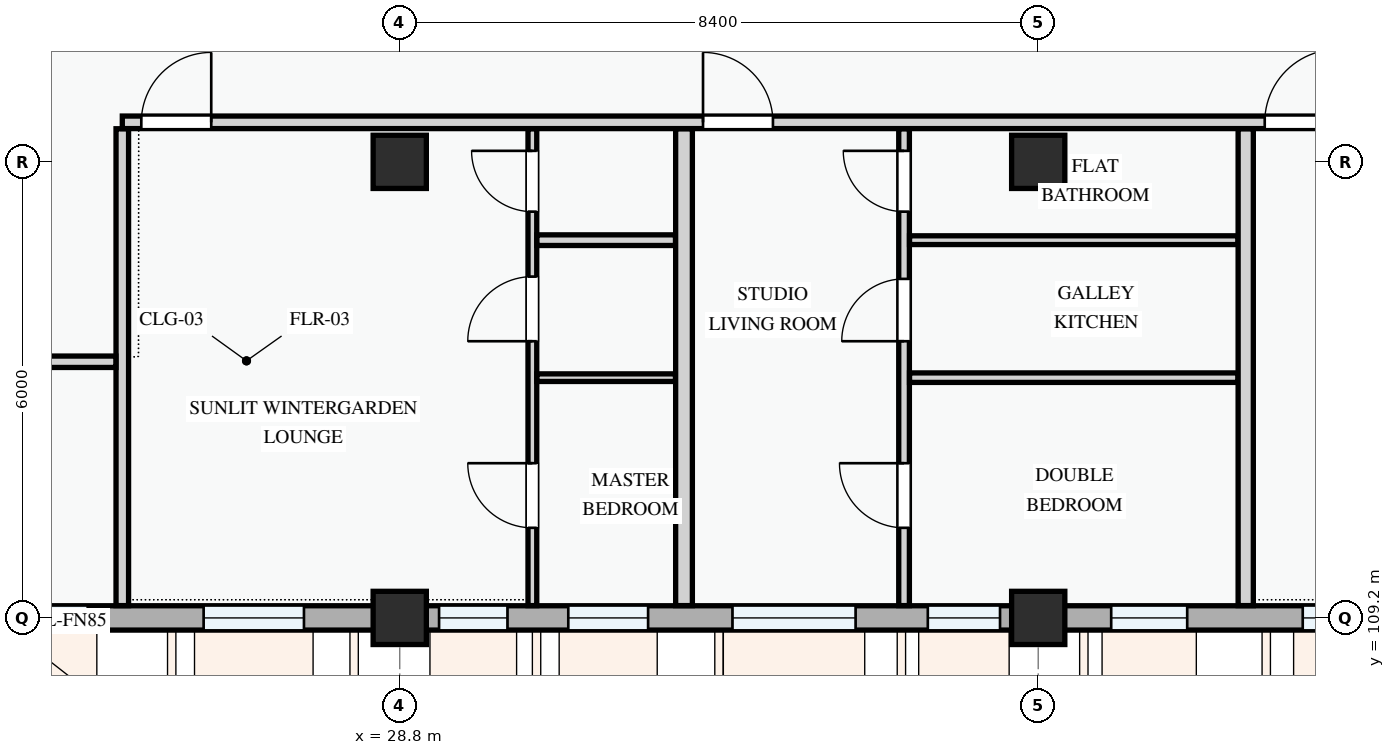
"""IFC4 building model, lengths in metres.
Left out: names, types, materials, properties, quantities, classifications, styles, units other than length and angle.
Written with IfcOpenShell. Run it as: python <this file> out.ifc"""

import sys

from ifc_helpers import new_model, si_unit, direction, frame, frame_2d, origin, origin_2d, place, context, subcontext, project, spatial, rectangle, extrude, element, fill, save


model = new_model("IFC4")
c1 = context("Model", 3, precision=1e-05, world=origin(), true_north=direction((0.0, 1.0)))
c2 = subcontext(c1, "Body", "Model", "MODEL_VIEW")
j1 = project(units=[si_unit("LENGTHUNIT", "METRE"), si_unit("PLANEANGLEUNIT", "RADIAN")], contexts=[c1])
p1 = place(None, origin())
s1 = spatial("IfcSite", under=j1, at=p1, CompositionType="ELEMENT")
p2 = place(p1, origin())
s2 = spatial("IfcBuilding", under=s1, at=p2, CompositionType="ELEMENT")
p3 = place(p2, frame((0.0, 0.0, 21.3)))
s3 = spatial("IfcBuildingStorey", under=s2, at=p3, CompositionType="ELEMENT", Elevation=21.3)
for number, where, z_axis, x_axis in (
    (1, (28.8, 109.2, 0.0), (0.0, 0.0, 1.0), (1.0, 0.0, 0.0)),
    (2, (28.8, 115.2, 0.0), (0.0, 0.0, 1.0), (1.0, 0.0, 0.0)),
    (3, (37.2, 109.2, 0.0), (0.0, 0.0, 1.0), (1.0, 0.0, 0.0)),
    (4, (37.2, 115.2, 0.0), (0.0, 0.0, 1.0), (1.0, 0.0, 0.0)),
):
    element("IfcColumn", number, at=place(p3, frame(where, z_axis=z_axis, x_axis=x_axis)), inside=s3, PredefinedType="COLUMN", context=c2, shape_type="SweptSolid", body=[
        extrude(rectangle(XDim=0.7, YDim=0.7, at=origin_2d()), origin(), (0.0, 0.0, 1.0), 3.3),
    ])
p4 = place(p3, frame((22.8, 109.2, 0.0), z_axis=(0.0, 0.0, 1.0), x_axis=(1.0, 0.0, 0.0)))
e5 = element("IfcWall", 5, at=p4, inside=s3, PredefinedType="STANDARD", context=c2, shape_type="SweptSolid", body=[
    extrude(rectangle(XDim=6.0, YDim=0.32, at=frame_2d((3.0, 0.0))), origin(), (0.0, 0.0, 1.0), 2.475),
])
p5 = place(p4, frame((0.645, 0.0, 0.78)))
e6 = element("IfcOpeningElement", 6, at=p5, cuts=e5, PredefinedType="OPENING", context=c2, shape_type="SweptSolid", body=[
    extrude(rectangle(XDim=1.25, YDim=1.45, at=frame_2d((0.625, 0.725))), frame((0.0, 0.17, 0.0), z_axis=(0.0, -1.0, 0.0), x_axis=(1.0, 0.0, 0.0)), (0.0, 0.0, 1.0), 0.34),
])
p6 = place(p4, frame((3.42, 0.0, 0.78)))
e7 = element("IfcOpeningElement", 7, at=p6, cuts=e5, PredefinedType="OPENING", context=c2, shape_type="SweptSolid", body=[
    extrude(rectangle(XDim=1.32, YDim=1.35, at=frame_2d((0.66, 0.675))), frame((0.0, 0.17, 0.0), z_axis=(0.0, -1.0, 0.0), x_axis=(1.0, 0.0, 0.0)), (0.0, 0.0, 1.0), 0.34),
])
p7 = place(p3, frame((28.8, 109.2, 0.0), z_axis=(0.0, 0.0, 1.0), x_axis=(1.0, 0.0, 0.0)))
e8 = element("IfcWall", 8, at=p7, inside=s3, PredefinedType="STANDARD", context=c2, shape_type="SweptSolid", body=[
    extrude(rectangle(XDim=8.4, YDim=0.32, at=frame_2d((4.2, 0.0))), origin(), (0.0, 0.0, 1.0), 2.375),
])
p8 = place(p7, frame((0.518, 0.0, 0.78)))
e9 = element("IfcOpeningElement", 9, at=p8, cuts=e8, PredefinedType="OPENING", context=c2, shape_type="SweptSolid", body=[
    extrude(rectangle(XDim=0.9, YDim=1.2, at=frame_2d((0.45, 0.6))), frame((0.0, 0.17, 0.0), z_axis=(0.0, -1.0, 0.0), x_axis=(1.0, 0.0, 0.0)), (0.0, 0.0, 1.0), 0.34),
])
p9 = place(p7, frame((2.218, 0.0, 0.78)))
e10 = element("IfcOpeningElement", 10, at=p9, cuts=e8, PredefinedType="OPENING", context=c2, shape_type="SweptSolid", body=[
    extrude(rectangle(XDim=1.05, YDim=1.2, at=frame_2d((0.525, 0.6))), frame((0.0, 0.17, 0.0), z_axis=(0.0, -1.0, 0.0), x_axis=(1.0, 0.0, 0.0)), (0.0, 0.0, 1.0), 0.34),
])
p10 = place(p7, frame((4.377, 0.0, 0.78)))
e11 = element("IfcOpeningElement", 11, at=p10, cuts=e8, PredefinedType="OPENING", context=c2, shape_type="SweptSolid", body=[
    extrude(rectangle(XDim=1.62, YDim=1.38, at=frame_2d((0.81, 0.69))), frame((0.0, 0.17, 0.0), z_axis=(0.0, -1.0, 0.0), x_axis=(1.0, 0.0, 0.0)), (0.0, 0.0, 1.0), 0.34),
])
p11 = place(p7, frame((6.948, 0.0, 0.78)))
e12 = element("IfcOpeningElement", 12, at=p11, cuts=e8, PredefinedType="OPENING", context=c2, shape_type="SweptSolid", body=[
    extrude(rectangle(XDim=0.95, YDim=1.15, at=frame_2d((0.475, 0.575))), frame((0.0, 0.17, 0.0), z_axis=(0.0, -1.0, 0.0), x_axis=(1.0, 0.0, 0.0)), (0.0, 0.0, 1.0), 0.34),
])
p12 = place(p3, frame((37.2, 109.2, 0.0), z_axis=(0.0, 0.0, 1.0), x_axis=(1.0, 0.0, 0.0)))
e13 = element("IfcWall", 13, at=p12, inside=s3, PredefinedType="STANDARD", context=c2, shape_type="SweptSolid", body=[
    extrude(rectangle(XDim=6.0, YDim=0.32, at=frame_2d((3.0, 0.0))), origin(), (0.0, 0.0, 1.0), 2.475),
])
p13 = place(p12, frame((0.96, 0.0, 0.78)))
e14 = element("IfcOpeningElement", 14, at=p13, cuts=e13, PredefinedType="OPENING", context=c2, shape_type="SweptSolid", body=[
    extrude(rectangle(XDim=1.0, YDim=1.25, at=frame_2d((0.5, 0.625))), frame((0.0, 0.17, 0.0), z_axis=(0.0, -1.0, 0.0), x_axis=(1.0, 0.0, 0.0)), (0.0, 0.0, 1.0), 0.34),
])
p14 = place(p12, frame((3.48, 0.0, 0.78)))
e15 = element("IfcOpeningElement", 15, at=p14, cuts=e13, PredefinedType="OPENING", context=c2, shape_type="SweptSolid", body=[
    extrude(rectangle(XDim=1.58, YDim=1.48, at=frame_2d((0.79, 0.74))), frame((0.0, 0.17, 0.0), z_axis=(0.0, -1.0, 0.0), x_axis=(1.0, 0.0, 0.0)), (0.0, 0.0, 1.0), 0.34),
])
p15 = place(p3, frame((25.15, 109.362, 0.0), z_axis=(0.0, 0.0, 1.0), x_axis=(0.0, 1.0, 0.0)))
e16 = element("IfcWall", 16, at=p15, inside=s3, PredefinedType="PARTITIONING", context=c2, shape_type="SweptSolid", body=[
    extrude(rectangle(XDim=6.273, YDim=0.165, at=frame_2d((3.137, 0.0))), origin(), (0.0, 0.0, 1.0), 3.0),
])
p16 = place(p3, frame((22.66, 112.57, 0.0), z_axis=(0.0, 0.0, 1.0), x_axis=(1.0, 0.0, 0.0)))
e17 = element("IfcWall", 17, at=p16, inside=s3, PredefinedType="PARTITIONING", context=c2, shape_type="SweptSolid", body=[
    extrude(rectangle(XDim=2.406, YDim=0.15, at=frame_2d((1.203, 0.0))), origin(), (0.0, 0.0, 1.0), 3.0),
])
p17 = place(p3, frame((30.545, 109.362, 0.0), z_axis=(0.0, 0.0, 1.0), x_axis=(0.0, 1.0, 0.0)))
e18 = element("IfcWall", 18, at=p17, inside=s3, PredefinedType="PARTITIONING", context=c2, shape_type="SweptSolid", body=[
    extrude(rectangle(XDim=6.273, YDim=0.115, at=frame_2d((3.137, 0.0))), origin(), (0.0, 0.0, 1.0), 3.0),
])
p18 = place(p17, frame((1.023, 0.0, 0.0)))
e19 = element("IfcOpeningElement", 19, at=p18, cuts=e18, PredefinedType="OPENING", context=c2, shape_type="SweptSolid", body=[
    extrude(rectangle(XDim=0.85, YDim=2.1, at=frame_2d((0.425, 1.05))), frame((0.0, 0.067, 0.0), z_axis=(0.0, -1.0, 0.0), x_axis=(1.0, 0.0, 0.0)), (0.0, 0.0, 1.0), 0.135),
])
p19 = place(p17, frame((3.478, 0.0, 0.0)))
e20 = element("IfcOpeningElement", 20, at=p19, cuts=e18, PredefinedType="OPENING", context=c2, shape_type="SweptSolid", body=[
    extrude(rectangle(XDim=0.85, YDim=2.1, at=frame_2d((0.425, 1.05))), frame((0.0, 0.067, 0.0), z_axis=(0.0, -1.0, 0.0), x_axis=(1.0, 0.0, 0.0)), (0.0, 0.0, 1.0), 0.135),
])
p20 = place(p17, frame((5.183, 0.0, 0.0)))
e21 = element("IfcOpeningElement", 21, at=p20, cuts=e18, PredefinedType="OPENING", context=c2, shape_type="SweptSolid", body=[
    extrude(rectangle(XDim=0.8, YDim=2.1, at=frame_2d((0.4, 1.05))), frame((0.0, 0.067, 0.0), z_axis=(0.0, -1.0, 0.0), x_axis=(1.0, 0.0, 0.0)), (0.0, 0.0, 1.0), 0.135),
])
p21 = place(p3, frame((30.604, 112.361, 0.0), z_axis=(0.0, 0.0, 1.0), x_axis=(1.0, 0.0, 0.0)))
e22 = element("IfcWall", 22, at=p21, inside=s3, PredefinedType="PARTITIONING", context=c2, shape_type="SweptSolid", body=[
    extrude(rectangle(XDim=1.823, YDim=0.1, at=frame_2d((0.912, 0.0))), origin(), (0.0, 0.0, 1.0), 3.0),
])
p22 = place(p3, frame((30.604, 114.17, 0.0), z_axis=(0.0, 0.0, 1.0), x_axis=(1.0, 0.0, 0.0)))
e23 = element("IfcWall", 23, at=p22, inside=s3, PredefinedType="PARTITIONING", context=c2, shape_type="SweptSolid", body=[
    extrude(rectangle(XDim=1.823, YDim=0.14, at=frame_2d((0.912, 0.0))), origin(), (0.0, 0.0, 1.0), 3.0),
])
p23 = place(p3, frame((35.435, 109.362, 0.0), z_axis=(0.0, 0.0, 1.0), x_axis=(0.0, 1.0, 0.0)))
e24 = element("IfcWall", 24, at=p23, inside=s3, PredefinedType="PARTITIONING", context=c2, shape_type="SweptSolid", body=[
    extrude(rectangle(XDim=6.273, YDim=0.14, at=frame_2d((3.137, 0.0))), origin(), (0.0, 0.0, 1.0), 3.0),
])
p24 = place(p23, frame((1.023, 0.0, 0.0)))
e25 = element("IfcOpeningElement", 25, at=p24, cuts=e24, PredefinedType="OPENING", context=c2, shape_type="SweptSolid", body=[
    extrude(rectangle(XDim=0.85, YDim=2.1, at=frame_2d((0.425, 1.05))), frame((0.0, 0.08, 0.0), z_axis=(0.0, -1.0, 0.0), x_axis=(1.0, 0.0, 0.0)), (0.0, 0.0, 1.0), 0.16),
])
p25 = place(p23, frame((3.478, 0.0, 0.0)))
e26 = element("IfcOpeningElement", 26, at=p25, cuts=e24, PredefinedType="OPENING", context=c2, shape_type="SweptSolid", body=[
    extrude(rectangle(XDim=0.82, YDim=2.08, at=frame_2d((0.41, 1.04))), frame((0.0, 0.08, 0.0), z_axis=(0.0, -1.0, 0.0), x_axis=(1.0, 0.0, 0.0)), (0.0, 0.0, 1.0), 0.16),
])
p26 = place(p23, frame((5.183, 0.0, 0.0)))
e27 = element("IfcOpeningElement", 27, at=p26, cuts=e24, PredefinedType="OPENING", context=c2, shape_type="SweptSolid", body=[
    extrude(rectangle(XDim=0.8, YDim=2.1, at=frame_2d((0.4, 1.05))), frame((0.0, 0.08, 0.0), z_axis=(0.0, -1.0, 0.0), x_axis=(1.0, 0.0, 0.0)), (0.0, 0.0, 1.0), 0.16),
])
p27 = place(p3, frame((35.507, 112.361, 0.0), z_axis=(0.0, 0.0, 1.0), x_axis=(1.0, 0.0, 0.0)))
e28 = element("IfcWall", 28, at=p27, inside=s3, PredefinedType="PARTITIONING", context=c2, shape_type="SweptSolid", body=[
    extrude(rectangle(XDim=4.321, YDim=0.125, at=frame_2d((2.16, 0.0))), origin(), (0.0, 0.0, 1.0), 3.0),
])
p28 = place(p3, frame((35.507, 114.17, 0.0), z_axis=(0.0, 0.0, 1.0), x_axis=(1.0, 0.0, 0.0)))
e29 = element("IfcWall", 29, at=p28, inside=s3, PredefinedType="PARTITIONING", context=c2, shape_type="SweptSolid", body=[
    extrude(rectangle(XDim=4.321, YDim=0.115, at=frame_2d((2.16, 0.0))), origin(), (0.0, 0.0, 1.0), 3.0),
])
p29 = place(p3, frame((32.54, 109.362, 0.0), z_axis=(0.0, 0.0, 1.0), x_axis=(0.0, 1.0, 0.0)))
e30 = element("IfcWall", 30, at=p29, inside=s3, PredefinedType="PARTITIONING", context=c2, shape_type="SweptSolid", body=[
    extrude(rectangle(XDim=6.273, YDim=0.22, at=frame_2d((3.137, 0.0))), origin(), (0.0, 0.0, 1.0), 3.0),
])
p30 = place(p3, frame((39.93, 109.362, 0.0), z_axis=(0.0, 0.0, 1.0), x_axis=(0.0, 1.0, 0.0)))
e31 = element("IfcWall", 31, at=p30, inside=s3, PredefinedType="PARTITIONING", context=c2, shape_type="SweptSolid", body=[
    extrude(rectangle(XDim=6.273, YDim=0.2, at=frame_2d((3.137, 0.0))), origin(), (0.0, 0.0, 1.0), 3.0),
])
p31 = place(p3, frame((25.15, 115.72, 0.0), z_axis=(0.0, 0.0, 1.0), x_axis=(1.0, 0.0, 0.0)))
e32 = element("IfcWall", 32, at=p31, inside=s3, PredefinedType="PARTITIONING", context=c2, shape_type="SweptSolid", body=[
    extrude(rectangle(XDim=26.288, YDim=0.165, at=frame_2d((13.144, 0.0))), origin(), (0.0, 0.0, 1.0), 3.0),
])
p32 = place(p31, frame((0.25, 0.0, 0.0)))
e33 = element("IfcOpeningElement", 33, at=p32, cuts=e32, PredefinedType="OPENING", context=c2, shape_type="SweptSolid", body=[
    extrude(rectangle(XDim=0.92, YDim=2.1, at=frame_2d((0.46, 1.05))), frame((0.0, 0.093, 0.0), z_axis=(0.0, -1.0, 0.0), x_axis=(1.0, 0.0, 0.0)), (0.0, 0.0, 1.0), 0.185),
])
p33 = place(p31, frame((7.64, 0.0, 0.0)))
e34 = element("IfcOpeningElement", 34, at=p33, cuts=e32, PredefinedType="OPENING", context=c2, shape_type="SweptSolid", body=[
    extrude(rectangle(XDim=0.92, YDim=2.1, at=frame_2d((0.46, 1.05))), frame((0.0, 0.093, 0.0), z_axis=(0.0, -1.0, 0.0), x_axis=(1.0, 0.0, 0.0)), (0.0, 0.0, 1.0), 0.185),
])
p34 = place(p31, frame((15.03, 0.0, 0.0)))
e35 = element("IfcOpeningElement", 35, at=p34, cuts=e32, PredefinedType="OPENING", context=c2, shape_type="SweptSolid", body=[
    extrude(rectangle(XDim=0.96, YDim=2.12, at=frame_2d((0.48, 1.06))), frame((0.0, 0.093, 0.0), z_axis=(0.0, -1.0, 0.0), x_axis=(1.0, 0.0, 0.0)), (0.0, 0.0, 1.0), 0.185),
])
p35 = place(p5, origin())
e36 = element("IfcWindow", 36, at=p35, inside=s3, PartitioningType="SINGLE_PANEL", PredefinedType="WINDOW", context=c2, shape_type="SweptSolid", body=[
    extrude(rectangle(XDim=1.25, YDim=1.45, at=frame_2d((0.625, 0.725))), frame((0.0, 0.03, 0.0), z_axis=(0.0, -1.0, 0.0), x_axis=(1.0, 0.0, 0.0)), (0.0, 0.0, 1.0), 0.06),
])
fill(e6, e36)
p36 = place(p6, origin())
e37 = element("IfcWindow", 37, at=p36, inside=s3, PartitioningType="SINGLE_PANEL", PredefinedType="WINDOW", context=c2, shape_type="SweptSolid", body=[
    extrude(rectangle(XDim=1.32, YDim=1.35, at=frame_2d((0.66, 0.675))), frame((0.0, 0.03, 0.0), z_axis=(0.0, -1.0, 0.0), x_axis=(1.0, 0.0, 0.0)), (0.0, 0.0, 1.0), 0.06),
])
fill(e7, e37)
p37 = place(p8, origin())
e38 = element("IfcWindow", 38, at=p37, inside=s3, PartitioningType="SINGLE_PANEL", PredefinedType="WINDOW", context=c2, shape_type="SweptSolid", body=[
    extrude(rectangle(XDim=0.9, YDim=1.2, at=frame_2d((0.45, 0.6))), frame((0.0, 0.03, 0.0), z_axis=(0.0, -1.0, 0.0), x_axis=(1.0, 0.0, 0.0)), (0.0, 0.0, 1.0), 0.06),
])
fill(e9, e38)
p38 = place(p9, origin())
e39 = element("IfcWindow", 39, at=p38, inside=s3, PartitioningType="SINGLE_PANEL", PredefinedType="WINDOW", context=c2, shape_type="SweptSolid", body=[
    extrude(rectangle(XDim=1.05, YDim=1.2, at=frame_2d((0.525, 0.6))), frame((0.0, 0.03, 0.0), z_axis=(0.0, -1.0, 0.0), x_axis=(1.0, 0.0, 0.0)), (0.0, 0.0, 1.0), 0.06),
])
fill(e10, e39)
p39 = place(p10, origin())
e40 = element("IfcWindow", 40, at=p39, inside=s3, PartitioningType="DOUBLE_PANEL_VERTICAL", PredefinedType="WINDOW", context=c2, shape_type="SweptSolid", body=[
    extrude(rectangle(XDim=1.62, YDim=1.38, at=frame_2d((0.81, 0.69))), frame((0.0, 0.03, 0.0), z_axis=(0.0, -1.0, 0.0), x_axis=(1.0, 0.0, 0.0)), (0.0, 0.0, 1.0), 0.06),
])
fill(e11, e40)
p40 = place(p11, origin())
e41 = element("IfcWindow", 41, at=p40, inside=s3, PartitioningType="SINGLE_PANEL", PredefinedType="WINDOW", context=c2, shape_type="SweptSolid", body=[
    extrude(rectangle(XDim=0.95, YDim=1.15, at=frame_2d((0.475, 0.575))), frame((0.0, 0.03, 0.0), z_axis=(0.0, -1.0, 0.0), x_axis=(1.0, 0.0, 0.0)), (0.0, 0.0, 1.0), 0.06),
])
fill(e12, e41)
p41 = place(p13, origin())
e42 = element("IfcWindow", 42, at=p41, inside=s3, PartitioningType="SINGLE_PANEL", PredefinedType="WINDOW", context=c2, shape_type="SweptSolid", body=[
    extrude(rectangle(XDim=1.0, YDim=1.25, at=frame_2d((0.5, 0.625))), frame((0.0, 0.03, 0.0), z_axis=(0.0, -1.0, 0.0), x_axis=(1.0, 0.0, 0.0)), (0.0, 0.0, 1.0), 0.06),
])
fill(e14, e42)
p42 = place(p14, origin())
e43 = element("IfcWindow", 43, at=p42, inside=s3, PartitioningType="SINGLE_PANEL", PredefinedType="WINDOW", context=c2, shape_type="SweptSolid", body=[
    extrude(rectangle(XDim=1.58, YDim=1.48, at=frame_2d((0.79, 0.74))), frame((0.0, 0.03, 0.0), z_axis=(0.0, -1.0, 0.0), x_axis=(1.0, 0.0, 0.0)), (0.0, 0.0, 1.0), 0.06),
])
fill(e15, e43)
p43 = place(p18, origin())
e44 = element("IfcDoor", 44, at=p43, inside=s3, OperationType="SINGLE_SWING_RIGHT", PredefinedType="DOOR", context=c2, shape_type="SweptSolid", body=[
    extrude(rectangle(XDim=0.85, YDim=2.1, at=frame_2d((0.425, 1.05))), frame((0.0, 0.025, 0.0), z_axis=(0.0, -1.0, 0.0), x_axis=(1.0, 0.0, 0.0)), (0.0, 0.0, 1.0), 0.05),
])
fill(e19, e44)
p44 = place(p19, origin())
e45 = element("IfcDoor", 45, at=p44, inside=s3, OperationType="SINGLE_SWING_LEFT", PredefinedType="DOOR", context=c2, shape_type="SweptSolid", body=[
    extrude(rectangle(XDim=0.85, YDim=2.1, at=frame_2d((0.425, 1.05))), frame((0.0, 0.025, 0.0), z_axis=(0.0, -1.0, 0.0), x_axis=(1.0, 0.0, 0.0)), (0.0, 0.0, 1.0), 0.05),
])
fill(e20, e45)
p45 = place(p20, origin())
e46 = element("IfcDoor", 46, at=p45, inside=s3, OperationType="SINGLE_SWING_RIGHT", PredefinedType="DOOR", context=c2, shape_type="SweptSolid", body=[
    extrude(rectangle(XDim=0.8, YDim=2.1, at=frame_2d((0.4, 1.05))), frame((0.0, 0.025, 0.0), z_axis=(0.0, -1.0, 0.0), x_axis=(1.0, 0.0, 0.0)), (0.0, 0.0, 1.0), 0.05),
])
fill(e21, e46)
p46 = place(p24, origin())
e47 = element("IfcDoor", 47, at=p46, inside=s3, OperationType="SINGLE_SWING_RIGHT", PredefinedType="DOOR", context=c2, shape_type="SweptSolid", body=[
    extrude(rectangle(XDim=0.85, YDim=2.1, at=frame_2d((0.425, 1.05))), frame((0.0, 0.025, 0.0), z_axis=(0.0, -1.0, 0.0), x_axis=(1.0, 0.0, 0.0)), (0.0, 0.0, 1.0), 0.05),
])
fill(e25, e47)
p47 = place(p25, origin())
e48 = element("IfcDoor", 48, at=p47, inside=s3, OperationType="SINGLE_SWING_LEFT", PredefinedType="DOOR", context=c2, shape_type="SweptSolid", body=[
    extrude(rectangle(XDim=0.82, YDim=2.08, at=frame_2d((0.41, 1.04))), frame((0.0, 0.025, 0.0), z_axis=(0.0, -1.0, 0.0), x_axis=(1.0, 0.0, 0.0)), (0.0, 0.0, 1.0), 0.05),
])
fill(e26, e48)
p48 = place(p26, origin())
e49 = element("IfcDoor", 49, at=p48, inside=s3, OperationType="SINGLE_SWING_RIGHT", PredefinedType="DOOR", context=c2, shape_type="SweptSolid", body=[
    extrude(rectangle(XDim=0.8, YDim=2.1, at=frame_2d((0.4, 1.05))), frame((0.0, 0.025, 0.0), z_axis=(0.0, -1.0, 0.0), x_axis=(1.0, 0.0, 0.0)), (0.0, 0.0, 1.0), 0.05),
])
fill(e27, e49)
p49 = place(p32, origin())
e50 = element("IfcDoor", 50, at=p49, inside=s3, OperationType="SINGLE_SWING_RIGHT", PredefinedType="DOOR", context=c2, shape_type="SweptSolid", body=[
    extrude(rectangle(XDim=0.92, YDim=2.1, at=frame_2d((0.46, 1.05))), frame((0.0, 0.025, 0.0), z_axis=(0.0, -1.0, 0.0), x_axis=(1.0, 0.0, 0.0)), (0.0, 0.0, 1.0), 0.05),
])
fill(e33, e50)
p50 = place(p33, origin())
e51 = element("IfcDoor", 51, at=p50, inside=s3, OperationType="SINGLE_SWING_LEFT", PredefinedType="DOOR", context=c2, shape_type="SweptSolid", body=[
    extrude(rectangle(XDim=0.92, YDim=2.1, at=frame_2d((0.46, 1.05))), frame((0.0, 0.025, 0.0), z_axis=(0.0, -1.0, 0.0), x_axis=(1.0, 0.0, 0.0)), (0.0, 0.0, 1.0), 0.05),
])
fill(e34, e51)
p51 = place(p34, origin())
e52 = element("IfcDoor", 52, at=p51, inside=s3, OperationType="SINGLE_SWING_RIGHT", PredefinedType="DOOR", context=c2, shape_type="SweptSolid", body=[
    extrude(rectangle(XDim=0.96, YDim=2.12, at=frame_2d((0.48, 1.06))), frame((0.0, 0.025, 0.0), z_axis=(0.0, -1.0, 0.0), x_axis=(1.0, 0.0, 0.0)), (0.0, 0.0, 1.0), 0.05),
])
fill(e35, e52)
save(model, sys.argv[1])
